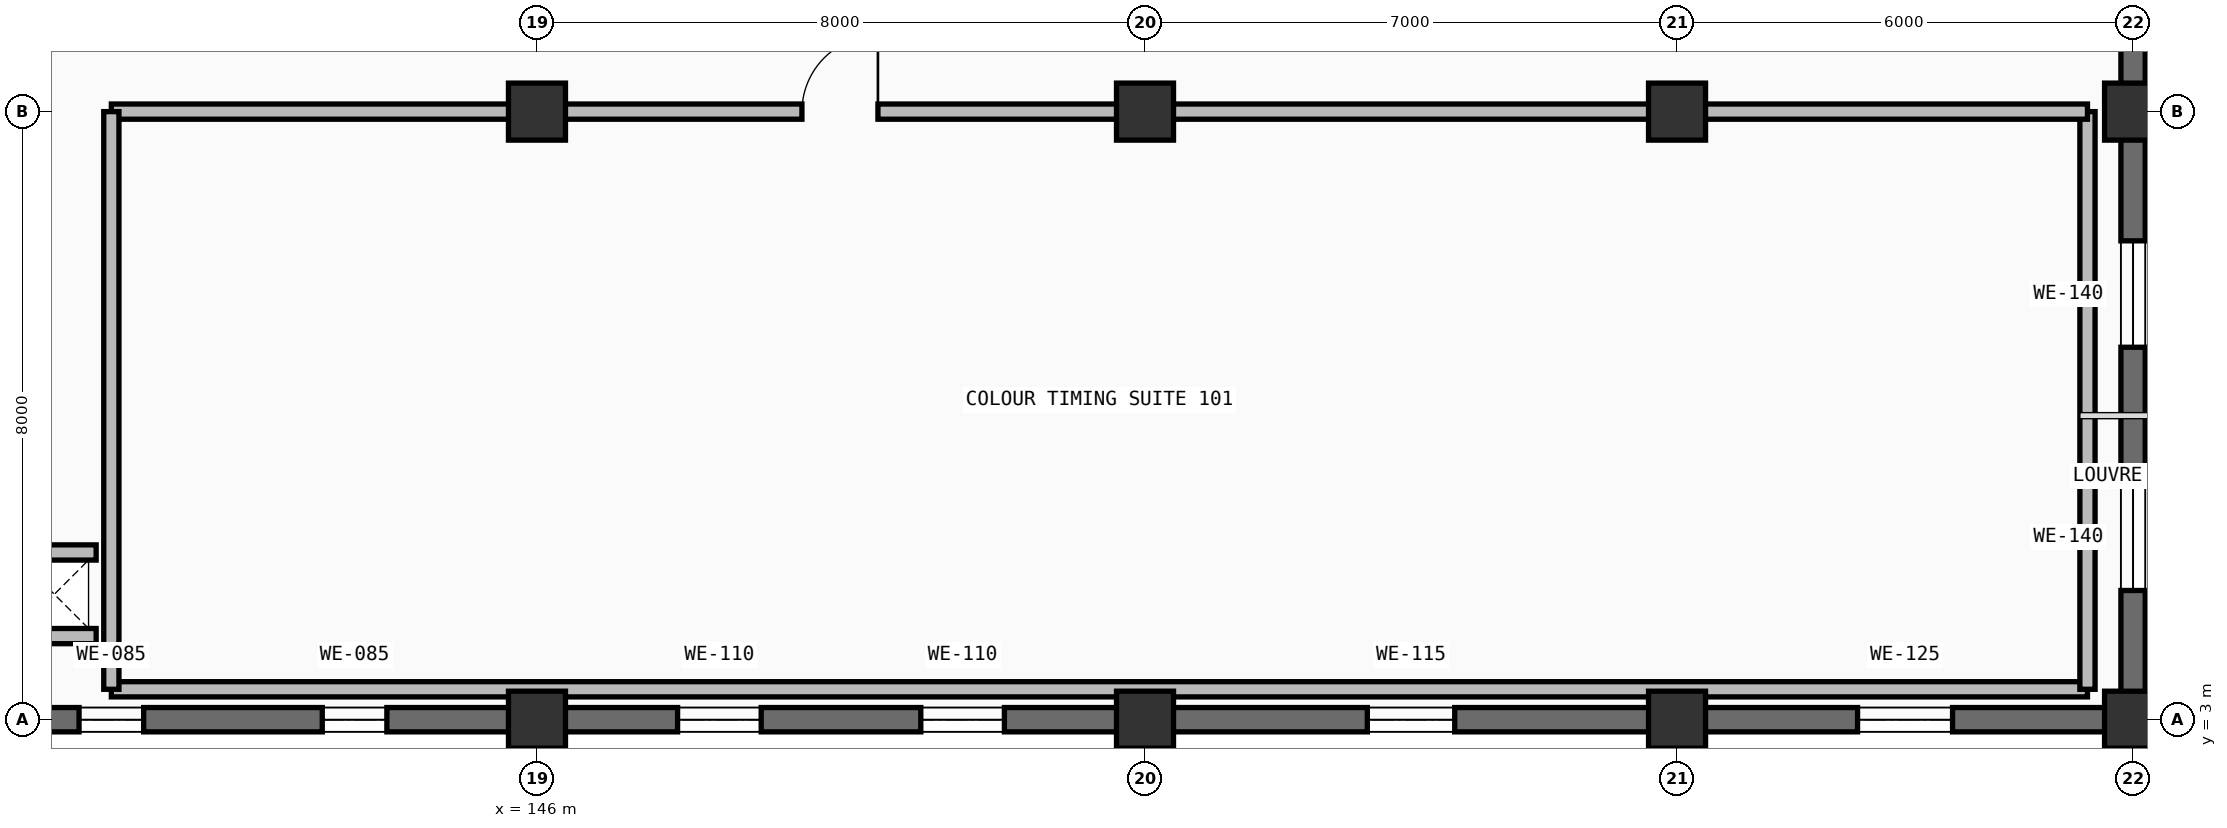
"""IFC4 building model, lengths in metres.
Left out: names, types, materials, properties, quantities, classifications, styles, units other than length and angle.
Written with IfcOpenShell. Run it as: python <this file> out.ifc"""

import sys

from ifc_helpers import new_model, si_unit, direction, frame, frame_2d, origin, origin_2d, place, context, subcontext, project, spatial, rectangle, extrude, element, fill, save


model = new_model("IFC4")
c1 = context("Model", 3, precision=1e-05, world=origin(), true_north=direction((0.0, 1.0)))
c2 = subcontext(c1, "Body", "Model", "MODEL_VIEW")
j1 = project(units=[si_unit("LENGTHUNIT", "METRE"), si_unit("PLANEANGLEUNIT", "RADIAN")], contexts=[c1])
p1 = place(None, origin())
s1 = spatial("IfcSite", under=j1, at=p1, CompositionType="ELEMENT")
p2 = place(p1, origin())
s2 = spatial("IfcBuilding", under=s1, at=p2, CompositionType="ELEMENT")
p3 = place(p2, frame((0.0, 0.0, 5.4)))
s3 = spatial("IfcBuildingStorey", under=s2, at=p3, CompositionType="ELEMENT", Elevation=5.4)
for number, where, z_axis, x_axis in (
    (1, (146.0, 3.0, 0.0), (0.0, 0.0, 1.0), (1.0, 0.0, 0.0)),
    (2, (146.0, 11.0, 0.0), (0.0, 0.0, 1.0), (1.0, 0.0, 0.0)),
    (3, (154.0, 3.0, 0.0), (0.0, 0.0, 1.0), (1.0, 0.0, 0.0)),
    (4, (154.0, 11.0, 0.0), (0.0, 0.0, 1.0), (1.0, 0.0, 0.0)),
    (5, (161.0, 3.0, 0.0), (0.0, 0.0, 1.0), (1.0, 0.0, 0.0)),
    (6, (161.0, 11.0, 0.0), (0.0, 0.0, 1.0), (1.0, 0.0, 0.0)),
    (7, (167.0, 3.0, 0.0), (0.0, 0.0, 1.0), (1.0, 0.0, 0.0)),
    (8, (167.0, 11.0, 0.0), (0.0, 0.0, 1.0), (1.0, 0.0, 0.0)),
):
    element("IfcColumn", number, at=place(p3, frame(where, z_axis=z_axis, x_axis=x_axis)), inside=s3, PredefinedType="COLUMN", context=c2, shape_type="SweptSolid", body=[
        extrude(rectangle(XDim=0.75, YDim=0.75, at=origin_2d()), origin(), (0.0, 0.0, 1.0), 4.5),
    ])
p4 = place(p3, frame((167.0, 19.0, 0.0), z_axis=(0.0, 0.0, 1.0), x_axis=(0.0, -1.0, 0.0)))
e9 = element("IfcWall", 9, at=p4, inside=s3, PredefinedType="SOLIDWALL", context=c2, shape_type="SweptSolid", body=[
    extrude(rectangle(XDim=8.0, YDim=0.32, at=frame_2d((4.0, 0.0))), origin(), (0.0, 0.0, 1.0), 4.5),
])
p5 = place(p4, frame((1.625, 0.0, 1.0)))
e10 = element("IfcOpeningElement", 10, at=p5, cuts=e9, PredefinedType="OPENING", context=c2, shape_type="SweptSolid", body=[
    extrude(rectangle(XDim=1.55, YDim=1.95, at=frame_2d((0.775, 0.975))), frame((0.0, 0.17, 0.0), z_axis=(0.0, -1.0, 0.0), x_axis=(1.0, 0.0, 0.0)), (0.0, 0.0, 1.0), 0.34),
])
p6 = place(p4, frame((4.825, 0.0, 1.0)))
e11 = element("IfcOpeningElement", 11, at=p6, cuts=e9, PredefinedType="OPENING", context=c2, shape_type="SweptSolid", body=[
    extrude(rectangle(XDim=1.55, YDim=1.95, at=frame_2d((0.775, 0.975))), frame((0.0, 0.17, 0.0), z_axis=(0.0, -1.0, 0.0), x_axis=(1.0, 0.0, 0.0)), (0.0, 0.0, 1.0), 0.34),
])
p7 = place(p3, frame((167.0, 11.0, 0.0), z_axis=(0.0, 0.0, 1.0), x_axis=(0.0, -1.0, 0.0)))
e12 = element("IfcWall", 12, at=p7, inside=s3, PredefinedType="SOLIDWALL", context=c2, shape_type="SweptSolid", body=[
    extrude(rectangle(XDim=8.0, YDim=0.32, at=frame_2d((4.0, 0.0))), origin(), (0.0, 0.0, 1.0), 4.5),
])
p8 = place(p7, frame((1.7, 0.0, 1.0)))
e13 = element("IfcOpeningElement", 13, at=p8, cuts=e12, PredefinedType="OPENING", context=c2, shape_type="SweptSolid", body=[
    extrude(rectangle(XDim=1.4, YDim=1.75, at=frame_2d((0.7, 0.875))), frame((0.0, 0.17, 0.0), z_axis=(0.0, -1.0, 0.0), x_axis=(1.0, 0.0, 0.0)), (0.0, 0.0, 1.0), 0.34),
])
p9 = place(p7, frame((4.9, 0.0, 1.0)))
e14 = element("IfcOpeningElement", 14, at=p9, cuts=e12, PredefinedType="OPENING", context=c2, shape_type="SweptSolid", body=[
    extrude(rectangle(XDim=1.4, YDim=1.75, at=frame_2d((0.7, 0.875))), frame((0.0, 0.17, 0.0), z_axis=(0.0, -1.0, 0.0), x_axis=(1.0, 0.0, 0.0)), (0.0, 0.0, 1.0), 0.34),
])
p10 = place(p3, frame((167.0, 3.0, 0.0), z_axis=(0.0, 0.0, 1.0), x_axis=(-1.0, 0.0, 0.0)))
e15 = element("IfcWall", 15, at=p10, inside=s3, PredefinedType="SOLIDWALL", context=c2, shape_type="SweptSolid", body=[
    extrude(rectangle(XDim=6.0, YDim=0.32, at=frame_2d((3.0, 0.0))), origin(), (0.0, 0.0, 1.0), 4.5),
])
p11 = place(p10, frame((2.375, 0.0, 1.0)))
e16 = element("IfcOpeningElement", 16, at=p11, cuts=e15, PredefinedType="OPENING", context=c2, shape_type="SweptSolid", body=[
    extrude(rectangle(XDim=1.25, YDim=1.6, at=frame_2d((0.625, 0.8))), frame((0.0, 0.17, 0.0), z_axis=(0.0, -1.0, 0.0), x_axis=(1.0, 0.0, 0.0)), (0.0, 0.0, 1.0), 0.34),
])
p12 = place(p3, frame((161.0, 3.0, 0.0), z_axis=(0.0, 0.0, 1.0), x_axis=(-1.0, 0.0, 0.0)))
e17 = element("IfcWall", 17, at=p12, inside=s3, PredefinedType="SOLIDWALL", context=c2, shape_type="SweptSolid", body=[
    extrude(rectangle(XDim=7.0, YDim=0.32, at=frame_2d((3.5, 0.0))), origin(), (0.0, 0.0, 1.0), 4.5),
])
p13 = place(p12, frame((2.925, 0.0, 1.0)))
e18 = element("IfcOpeningElement", 18, at=p13, cuts=e17, PredefinedType="OPENING", context=c2, shape_type="SweptSolid", body=[
    extrude(rectangle(XDim=1.15, YDim=1.55, at=frame_2d((0.575, 0.775))), frame((0.0, 0.17, 0.0), z_axis=(0.0, -1.0, 0.0), x_axis=(1.0, 0.0, 0.0)), (0.0, 0.0, 1.0), 0.34),
])
p14 = place(p3, frame((154.0, 3.0, 0.0), z_axis=(0.0, 0.0, 1.0), x_axis=(-1.0, 0.0, 0.0)))
e19 = element("IfcWall", 19, at=p14, inside=s3, PredefinedType="SOLIDWALL", context=c2, shape_type="SweptSolid", body=[
    extrude(rectangle(XDim=8.0, YDim=0.32, at=frame_2d((4.0, 0.0))), origin(), (0.0, 0.0, 1.0), 4.5),
])
p15 = place(p14, frame((1.85, 0.0, 1.0)))
e20 = element("IfcOpeningElement", 20, at=p15, cuts=e19, PredefinedType="OPENING", context=c2, shape_type="SweptSolid", body=[
    extrude(rectangle(XDim=1.1, YDim=1.45, at=frame_2d((0.55, 0.725))), frame((0.0, 0.17, 0.0), z_axis=(0.0, -1.0, 0.0), x_axis=(1.0, 0.0, 0.0)), (0.0, 0.0, 1.0), 0.34),
])
p16 = place(p14, frame((5.05, 0.0, 1.0)))
e21 = element("IfcOpeningElement", 21, at=p16, cuts=e19, PredefinedType="OPENING", context=c2, shape_type="SweptSolid", body=[
    extrude(rectangle(XDim=1.1, YDim=1.45, at=frame_2d((0.55, 0.725))), frame((0.0, 0.17, 0.0), z_axis=(0.0, -1.0, 0.0), x_axis=(1.0, 0.0, 0.0)), (0.0, 0.0, 1.0), 0.34),
])
p17 = place(p3, frame((146.0, 3.0, 0.0), z_axis=(0.0, 0.0, 1.0), x_axis=(-1.0, 0.0, 0.0)))
e22 = element("IfcWall", 22, at=p17, inside=s3, PredefinedType="SOLIDWALL", context=c2, shape_type="SweptSolid", body=[
    extrude(rectangle(XDim=8.0, YDim=0.32, at=frame_2d((4.0, 0.0))), origin(), (0.0, 0.0, 1.0), 4.5),
])
p18 = place(p17, frame((1.975, 0.0, 1.0)))
e23 = element("IfcOpeningElement", 23, at=p18, cuts=e22, PredefinedType="OPENING", context=c2, shape_type="SweptSolid", body=[
    extrude(rectangle(XDim=0.85, YDim=1.2, at=frame_2d((0.425, 0.6))), frame((0.0, 0.17, 0.0), z_axis=(0.0, -1.0, 0.0), x_axis=(1.0, 0.0, 0.0)), (0.0, 0.0, 1.0), 0.34),
])
p19 = place(p17, frame((5.175, 0.0, 1.0)))
e24 = element("IfcOpeningElement", 24, at=p19, cuts=e22, PredefinedType="OPENING", context=c2, shape_type="SweptSolid", body=[
    extrude(rectangle(XDim=0.85, YDim=1.2, at=frame_2d((0.425, 0.6))), frame((0.0, 0.17, 0.0), z_axis=(0.0, -1.0, 0.0), x_axis=(1.0, 0.0, 0.0)), (0.0, 0.0, 1.0), 0.34),
])
p20 = place(p3, frame((140.4, 3.4, 0.0), z_axis=(0.0, 0.0, 1.0), x_axis=(1.0, 0.0, 0.0)))
e25 = element("IfcWall", 25, at=p20, inside=s3, PredefinedType="PARTITIONING", context=c2, shape_type="SweptSolid", body=[
    extrude(rectangle(XDim=26.0, YDim=0.2, at=frame_2d((13.0, 0.0))), origin(), (0.0, 0.0, 1.0), 3.505),
])
p21 = place(p3, frame((166.4, 3.4, 0.0), z_axis=(0.0, 0.0, 1.0), x_axis=(0.0, 1.0, 0.0)))
e26 = element("IfcWall", 26, at=p21, inside=s3, PredefinedType="PARTITIONING", context=c2, shape_type="SweptSolid", body=[
    extrude(rectangle(XDim=7.6, YDim=0.2, at=frame_2d((3.8, 0.0))), origin(), (0.0, 0.0, 1.0), 4.2),
])
p22 = place(p3, frame((140.4, 11.0, 0.0), z_axis=(0.0, 0.0, 1.0), x_axis=(1.0, 0.0, 0.0)))
e27 = element("IfcWall", 27, at=p22, inside=s3, PredefinedType="PARTITIONING", context=c2, shape_type="SweptSolid", body=[
    extrude(rectangle(XDim=26.0, YDim=0.2, at=frame_2d((13.0, 0.0))), origin(), (0.0, 0.0, 1.0), 3.435),
])
p23 = place(p22, frame((9.086, 0.0, 0.0)))
e28 = element("IfcOpeningElement", 28, at=p23, cuts=e27, PredefinedType="OPENING", context=c2, shape_type="SweptSolid", body=[
    extrude(rectangle(XDim=1.0, YDim=2.15, at=frame_2d((0.5, 1.075))), frame((0.0, 0.11, 0.0), z_axis=(0.0, -1.0, 0.0), x_axis=(1.0, 0.0, 0.0)), (0.0, 0.0, 1.0), 0.22),
])
p24 = place(p3, frame((140.4, 3.4, 0.0), z_axis=(0.0, 0.0, 1.0), x_axis=(0.0, 1.0, 0.0)))
e29 = element("IfcWall", 29, at=p24, inside=s3, PredefinedType="PARTITIONING", context=c2, shape_type="SweptSolid", body=[
    extrude(rectangle(XDim=7.6, YDim=0.2, at=frame_2d((3.8, 0.0))), origin(), (0.0, 0.0, 1.0), 4.2),
])
for number, where, z_axis, x_axis in (
    (30, (139.1, 4.1, 0.0), (0.0, 0.0, 1.0), (1.0, 0.0, 0.0)),
    (31, (139.1, 5.2, 0.0), (0.0, 0.0, 1.0), (1.0, 0.0, 0.0)),
):
    element("IfcWall", number, at=place(p3, frame(where, z_axis=z_axis, x_axis=x_axis)), inside=s3, PredefinedType="PARTITIONING", context=c2, shape_type="SweptSolid", body=[
        extrude(rectangle(XDim=1.1, YDim=0.2, at=frame_2d((0.55, 0.0))), origin(), (0.0, 0.0, 1.0), 4.2),
    ])
p25 = place(p8, origin())
e32 = element("IfcWindow", 32, at=p25, inside=s3, PartitioningType="SINGLE_PANEL", PredefinedType="WINDOW", context=c2, shape_type="SweptSolid", body=[
    extrude(rectangle(XDim=1.4, YDim=1.75, at=frame_2d((0.7, 0.875))), frame((0.0, 0.03, 0.0), z_axis=(0.0, -1.0, 0.0), x_axis=(1.0, 0.0, 0.0)), (0.0, 0.0, 1.0), 0.06),
])
fill(e13, e32)
p26 = place(p9, origin())
e33 = element("IfcWindow", 33, at=p26, inside=s3, PartitioningType="SINGLE_PANEL", PredefinedType="WINDOW", context=c2, shape_type="SweptSolid", body=[
    extrude(rectangle(XDim=1.4, YDim=1.75, at=frame_2d((0.7, 0.875))), frame((0.0, 0.03, 0.0), z_axis=(0.0, -1.0, 0.0), x_axis=(1.0, 0.0, 0.0)), (0.0, 0.0, 1.0), 0.06),
])
fill(e14, e33)
p27 = place(p11, origin())
e34 = element("IfcWindow", 34, at=p27, inside=s3, PartitioningType="SINGLE_PANEL", PredefinedType="WINDOW", context=c2, shape_type="SweptSolid", body=[
    extrude(rectangle(XDim=1.25, YDim=1.6, at=frame_2d((0.625, 0.8))), frame((0.0, 0.03, 0.0), z_axis=(0.0, -1.0, 0.0), x_axis=(1.0, 0.0, 0.0)), (0.0, 0.0, 1.0), 0.06),
])
fill(e16, e34)
p28 = place(p13, origin())
e35 = element("IfcWindow", 35, at=p28, inside=s3, PartitioningType="SINGLE_PANEL", PredefinedType="WINDOW", context=c2, shape_type="SweptSolid", body=[
    extrude(rectangle(XDim=1.15, YDim=1.55, at=frame_2d((0.575, 0.775))), frame((0.0, 0.03, 0.0), z_axis=(0.0, -1.0, 0.0), x_axis=(1.0, 0.0, 0.0)), (0.0, 0.0, 1.0), 0.06),
])
fill(e18, e35)
p29 = place(p15, origin())
e36 = element("IfcWindow", 36, at=p29, inside=s3, PartitioningType="SINGLE_PANEL", PredefinedType="WINDOW", context=c2, shape_type="SweptSolid", body=[
    extrude(rectangle(XDim=1.1, YDim=1.45, at=frame_2d((0.55, 0.725))), frame((0.0, 0.03, 0.0), z_axis=(0.0, -1.0, 0.0), x_axis=(1.0, 0.0, 0.0)), (0.0, 0.0, 1.0), 0.06),
])
fill(e20, e36)
p30 = place(p16, origin())
e37 = element("IfcWindow", 37, at=p30, inside=s3, PartitioningType="SINGLE_PANEL", PredefinedType="WINDOW", context=c2, shape_type="SweptSolid", body=[
    extrude(rectangle(XDim=1.1, YDim=1.45, at=frame_2d((0.55, 0.725))), frame((0.0, 0.03, 0.0), z_axis=(0.0, -1.0, 0.0), x_axis=(1.0, 0.0, 0.0)), (0.0, 0.0, 1.0), 0.06),
])
fill(e21, e37)
p31 = place(p18, origin())
e38 = element("IfcWindow", 38, at=p31, inside=s3, PartitioningType="SINGLE_PANEL", PredefinedType="WINDOW", context=c2, shape_type="SweptSolid", body=[
    extrude(rectangle(XDim=0.85, YDim=1.2, at=frame_2d((0.425, 0.6))), frame((0.0, 0.03, 0.0), z_axis=(0.0, -1.0, 0.0), x_axis=(1.0, 0.0, 0.0)), (0.0, 0.0, 1.0), 0.06),
])
fill(e23, e38)
p32 = place(p19, origin())
e39 = element("IfcWindow", 39, at=p32, inside=s3, PartitioningType="SINGLE_PANEL", PredefinedType="WINDOW", context=c2, shape_type="SweptSolid", body=[
    extrude(rectangle(XDim=0.85, YDim=1.2, at=frame_2d((0.425, 0.6))), frame((0.0, 0.03, 0.0), z_axis=(0.0, -1.0, 0.0), x_axis=(1.0, 0.0, 0.0)), (0.0, 0.0, 1.0), 0.06),
])
fill(e24, e39)
p33 = place(p23, origin())
e40 = element("IfcDoor", 40, at=p33, inside=s3, OperationType="SINGLE_SWING_RIGHT", PredefinedType="DOOR", context=c2, shape_type="SweptSolid", body=[
    extrude(rectangle(XDim=1.0, YDim=2.15, at=frame_2d((0.5, 1.075))), frame((0.0, 0.025, 0.0), z_axis=(0.0, -1.0, 0.0), x_axis=(1.0, 0.0, 0.0)), (0.0, 0.0, 1.0), 0.05),
])
fill(e28, e40)
save(model, sys.argv[1])
